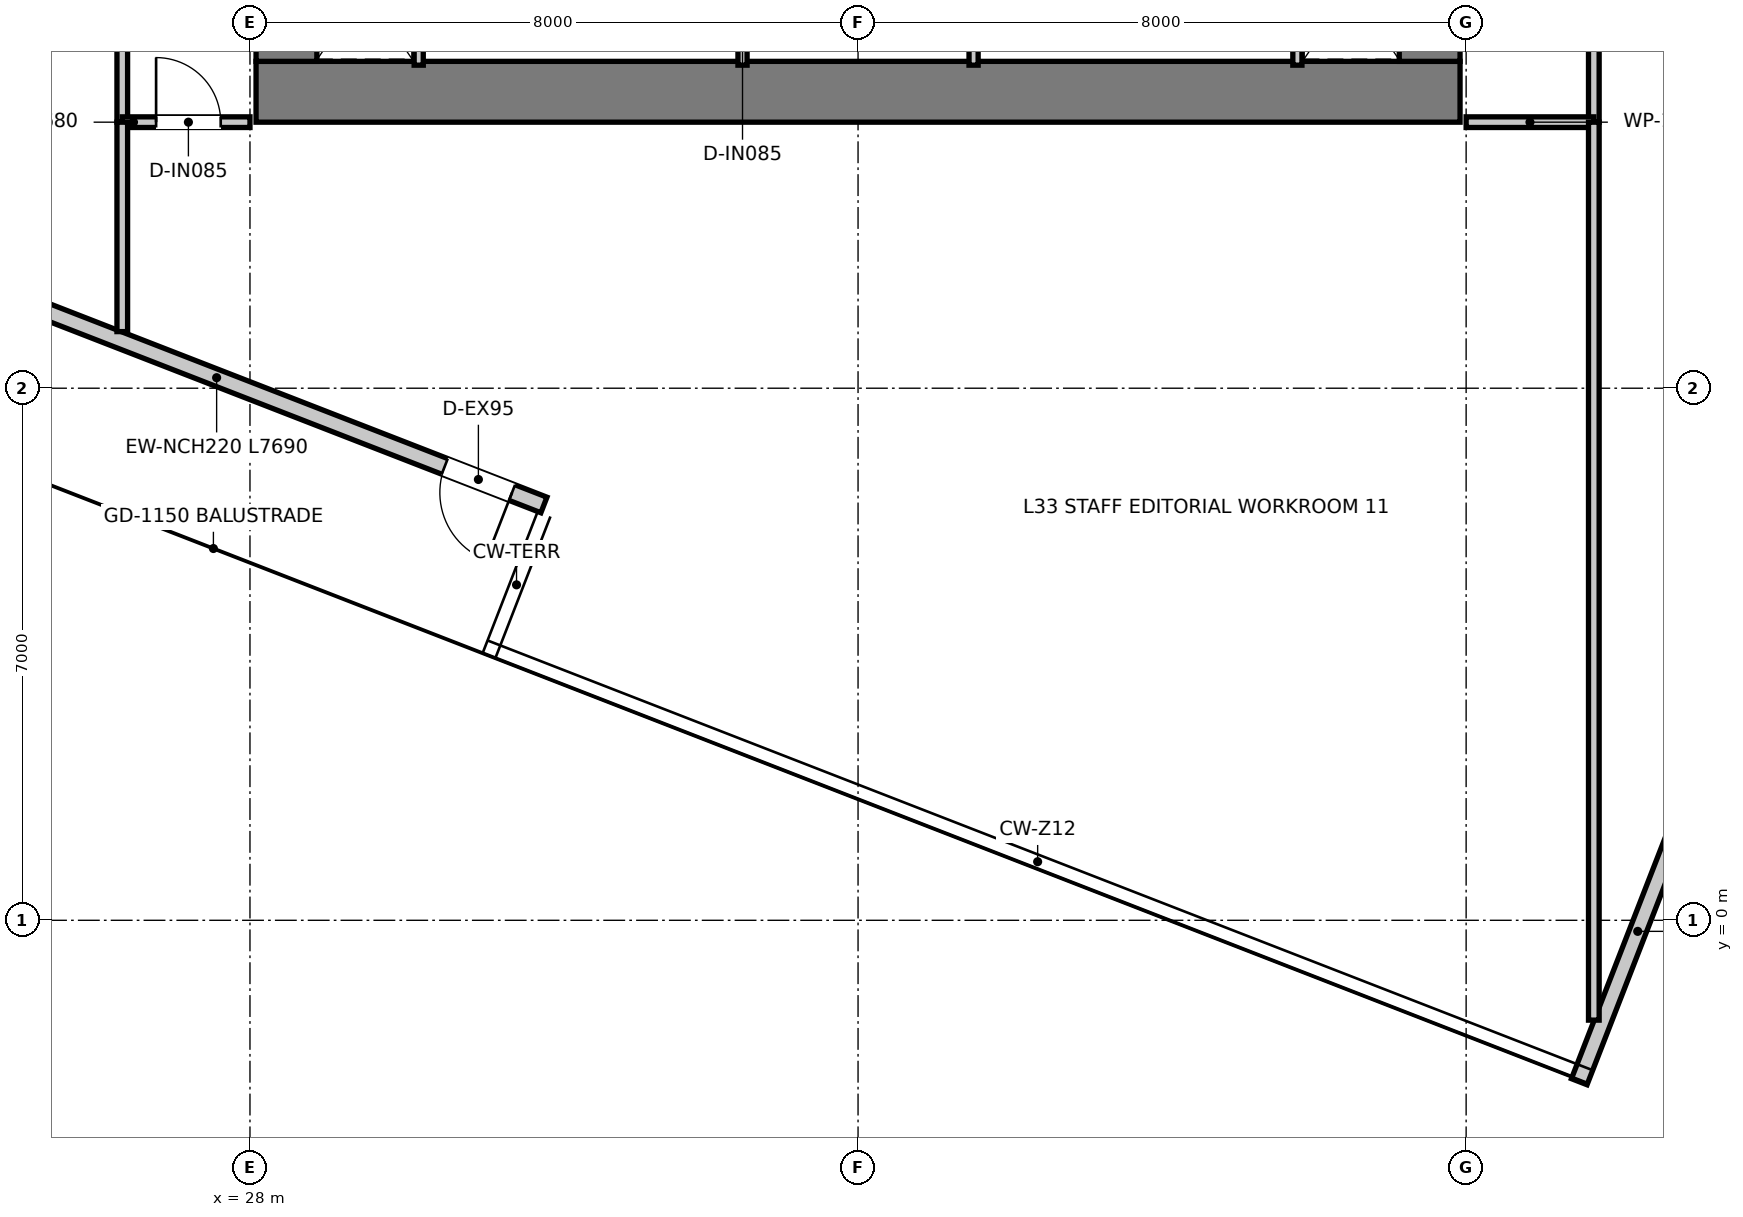
"""IFC4 building model, lengths in metres.
Left out: names, types, materials, properties, quantities, classifications, styles, units other than length and angle.
Written with IfcOpenShell. Run it as: python <this file> out.ifc"""

import sys

from ifc_helpers import new_model, si_unit, direction, frame, frame_2d, origin, place, context, subcontext, project, spatial, rectangle, extrude, element, fill, save


model = new_model("IFC4")
c1 = context("Model", 3, precision=1e-05, world=origin(), true_north=direction((0.0, 1.0)))
c2 = subcontext(c1, "Body", "Model", "MODEL_VIEW")
j1 = project(units=[si_unit("LENGTHUNIT", "METRE"), si_unit("PLANEANGLEUNIT", "RADIAN")], contexts=[c1])
p1 = place(None, origin())
s1 = spatial("IfcSite", under=j1, at=p1, CompositionType="ELEMENT")
p2 = place(p1, origin())
s2 = spatial("IfcBuilding", under=s1, at=p2, CompositionType="ELEMENT")
p3 = place(p2, frame((0.0, 0.0, 137.45)))
s3 = spatial("IfcBuildingStorey", under=s2, at=p3, CompositionType="ELEMENT", Elevation=137.45)
p4 = place(p3, frame((28.08, 10.9, 0.0), z_axis=(0.0, 0.0, 1.0), x_axis=(1.0, 0.0, 0.0)))
e1 = element("IfcWall", 1, at=p4, inside=s3, PredefinedType="SHEAR", context=c2, shape_type="SweptSolid", body=[
    extrude(rectangle(XDim=15.84, YDim=0.8, at=frame_2d((7.92, 0.0))), origin(), (0.0, 0.0, 1.0), 3.95),
])
for number, where, z_axis, x_axis in (
    (2, (28.48, 11.3, 0.0), (0.0, 0.0, 1.0), (0.0, 1.0, 0.0)),
    (3, (43.52, 11.3, 0.0), (0.0, 0.0, 1.0), (0.0, 1.0, 0.0)),
):
    element("IfcWall", number, at=place(p3, frame(where, z_axis=z_axis, x_axis=x_axis)), inside=s3, PredefinedType="SHEAR", context=c2, shape_type="SweptSolid", body=[
        extrude(rectangle(XDim=14.7, YDim=0.8, at=frame_2d((7.35, 0.0))), origin(), (0.0, 0.0, 1.0), 3.95),
    ])
p5 = place(p3, frame((31.867, 5.464, 0.0), z_axis=(0.0, 0.0, 1.0), x_axis=(-0.931996329979, 0.362467710157, 0.0)))
e4 = element("IfcWall", 4, at=p5, inside=s3, PredefinedType="ELEMENTEDWALL", context=c2, shape_type="SweptSolid", body=[
    extrude(rectangle(XDim=7.69, YDim=0.22, at=frame_2d((3.845, 0.0))), origin(), (0.0, 0.0, 1.0), 3.6),
])
p6 = place(p5, frame((0.45, 0.0, 0.0)))
e5 = element("IfcOpeningElement", 5, at=p6, cuts=e4, PredefinedType="OPENING", context=c2, shape_type="SweptSolid", body=[
    extrude(rectangle(XDim=0.95, YDim=2.1, at=frame_2d((0.475, 1.05))), frame((0.0, 0.12, 0.0), z_axis=(0.0, -1.0, 0.0), x_axis=(1.0, 0.0, 0.0)), (0.0, 0.0, 1.0), 0.24),
])
p7 = place(p3, frame((45.488, -2.124, 0.0), z_axis=(0.0, 0.0, 1.0), x_axis=(0.362429609335, 0.932011147078, 0.0)))
e6 = element("IfcWall", 6, at=p7, inside=s3, PredefinedType="ELEMENTEDWALL", context=c2, shape_type="SweptSolid", body=[
    extrude(rectangle(XDim=4.245, YDim=0.22, at=frame_2d((2.123, 0.0))), origin(), (0.0, 0.0, 1.0), 3.6),
])
for number, where, z_axis, x_axis in (
    (7, (30.22, 11.25, 0.0), (0.0, 0.0, 1.0), (0.0, 1.0, 0.0)),
    (8, (41.78, 11.25, 0.0), (0.0, 0.0, 1.0), (0.0, 1.0, 0.0)),
):
    element("IfcWall", number, at=place(p3, frame(where, z_axis=z_axis, x_axis=x_axis)), inside=s3, PredefinedType="PARTITIONING", context=c2, shape_type="SweptSolid", body=[
        extrude(rectangle(XDim=1.97, YDim=0.12, at=frame_2d((0.985, 0.0))), origin(), (0.0, 0.0, 1.0), 3.6),
    ])
p8 = place(p3, frame((34.48, 11.25, 0.0), z_axis=(0.0, 0.0, 1.0), x_axis=(0.0, 1.0, 0.0)))
e9 = element("IfcWall", 9, at=p8, inside=s3, PredefinedType="PARTITIONING", context=c2, shape_type="SweptSolid", body=[
    extrude(rectangle(XDim=1.97, YDim=0.12, at=frame_2d((0.985, 0.0))), origin(), (0.0, 0.0, 1.0), 3.6),
])
p9 = place(p8, frame((0.545, 0.0, 0.0)))
e10 = element("IfcOpeningElement", 10, at=p9, cuts=e9, PredefinedType="OPENING", context=c2, shape_type="SweptSolid", body=[
    extrude(rectangle(XDim=0.85, YDim=2.1, at=frame_2d((0.425, 1.05))), frame((0.0, 0.07, 0.0), z_axis=(0.0, -1.0, 0.0), x_axis=(1.0, 0.0, 0.0)), (0.0, 0.0, 1.0), 0.14),
])
p10 = place(p3, frame((37.52, 11.25, 0.0), z_axis=(0.0, 0.0, 1.0), x_axis=(0.0, 1.0, 0.0)))
e11 = element("IfcWall", 11, at=p10, inside=s3, PredefinedType="PARTITIONING", context=c2, shape_type="SweptSolid", body=[
    extrude(rectangle(XDim=1.97, YDim=0.12, at=frame_2d((0.985, 0.0))), origin(), (0.0, 0.0, 1.0), 3.6),
])
p11 = place(p10, frame((0.545, 0.0, 0.0)))
e12 = element("IfcOpeningElement", 12, at=p11, cuts=e11, PredefinedType="OPENING", context=c2, shape_type="SweptSolid", body=[
    extrude(rectangle(XDim=0.85, YDim=2.1, at=frame_2d((0.425, 1.05))), frame((0.0, 0.07, 0.0), z_axis=(0.0, -1.0, 0.0), x_axis=(1.0, 0.0, 0.0)), (0.0, 0.0, 1.0), 0.14),
])
p12 = place(p3, frame((26.32, 10.5, 0.0), z_axis=(0.0, 0.0, 1.0), x_axis=(0.0, 1.0, 0.0)))
e13 = element("IfcWall", 13, at=p12, inside=s3, PredefinedType="PARTITIONING", context=c2, shape_type="SweptSolid", body=[
    extrude(rectangle(XDim=25.62, YDim=0.14, at=frame_2d((12.81, 0.0))), origin(), (0.0, 0.0, 1.0), 2.9),
])
p13 = place(p12, frame((9.525, 0.0, 0.0)))
e14 = element("IfcOpeningElement", 14, at=p13, cuts=e13, PredefinedType="OPENING", context=c2, shape_type="SweptSolid", body=[
    extrude(rectangle(XDim=0.95, YDim=2.1, at=frame_2d((0.475, 1.05))), frame((0.0, 0.08, 0.0), z_axis=(0.0, -1.0, 0.0), x_axis=(1.0, 0.0, 0.0)), (0.0, 0.0, 1.0), 0.16),
])
p14 = place(p12, frame((16.525, 0.0, 0.0)))
e15 = element("IfcOpeningElement", 15, at=p14, cuts=e13, PredefinedType="OPENING", context=c2, shape_type="SweptSolid", body=[
    extrude(rectangle(XDim=0.95, YDim=2.1, at=frame_2d((0.475, 1.05))), frame((0.0, 0.08, 0.0), z_axis=(0.0, -1.0, 0.0), x_axis=(1.0, 0.0, 0.0)), (0.0, 0.0, 1.0), 0.16),
])
p15 = place(p12, frame((22.125, 0.0, 0.0)))
e16 = element("IfcOpeningElement", 16, at=p15, cuts=e13, PredefinedType="OPENING", context=c2, shape_type="SweptSolid", body=[
    extrude(rectangle(XDim=0.95, YDim=2.1, at=frame_2d((0.475, 1.05))), frame((0.0, 0.08, 0.0), z_axis=(0.0, -1.0, 0.0), x_axis=(1.0, 0.0, 0.0)), (0.0, 0.0, 1.0), 0.16),
])
p16 = place(p3, frame((45.68, 10.5, 0.0), z_axis=(0.0, 0.0, 1.0), x_axis=(0.0, 1.0, 0.0)))
e17 = element("IfcWall", 17, at=p16, inside=s3, PredefinedType="PARTITIONING", context=c2, shape_type="SweptSolid", body=[
    extrude(rectangle(XDim=25.62, YDim=0.14, at=frame_2d((12.81, 0.0))), origin(), (0.0, 0.0, 1.0), 2.9),
])
p17 = place(p16, frame((7.775, 0.0, 0.0)))
e18 = element("IfcOpeningElement", 18, at=p17, cuts=e17, PredefinedType="OPENING", context=c2, shape_type="SweptSolid", body=[
    extrude(rectangle(XDim=0.95, YDim=2.1, at=frame_2d((0.475, 1.05))), frame((0.0, 0.08, 0.0), z_axis=(0.0, -1.0, 0.0), x_axis=(1.0, 0.0, 0.0)), (0.0, 0.0, 1.0), 0.16),
])
p18 = place(p16, frame((11.775, 0.0, 0.0)))
e19 = element("IfcOpeningElement", 19, at=p18, cuts=e17, PredefinedType="OPENING", context=c2, shape_type="SweptSolid", body=[
    extrude(rectangle(XDim=0.95, YDim=2.1, at=frame_2d((0.475, 1.05))), frame((0.0, 0.08, 0.0), z_axis=(0.0, -1.0, 0.0), x_axis=(1.0, 0.0, 0.0)), (0.0, 0.0, 1.0), 0.16),
])
p19 = place(p16, frame((17.275, 0.0, 0.0)))
e20 = element("IfcOpeningElement", 20, at=p19, cuts=e17, PredefinedType="OPENING", context=c2, shape_type="SweptSolid", body=[
    extrude(rectangle(XDim=0.95, YDim=2.1, at=frame_2d((0.475, 1.05))), frame((0.0, 0.08, 0.0), z_axis=(0.0, -1.0, 0.0), x_axis=(1.0, 0.0, 0.0)), (0.0, 0.0, 1.0), 0.16),
])
p20 = place(p16, frame((21.875, 0.0, 0.0)))
e21 = element("IfcOpeningElement", 21, at=p20, cuts=e17, PredefinedType="OPENING", context=c2, shape_type="SweptSolid", body=[
    extrude(rectangle(XDim=0.95, YDim=2.1, at=frame_2d((0.475, 1.05))), frame((0.0, 0.08, 0.0), z_axis=(0.0, -1.0, 0.0), x_axis=(1.0, 0.0, 0.0)), (0.0, 0.0, 1.0), 0.16),
])
p21 = place(p3, frame((26.32, 10.5, 0.0), z_axis=(0.0, 0.0, 1.0), x_axis=(1.0, 0.0, 0.0)))
e22 = element("IfcWall", 22, at=p21, inside=s3, PredefinedType="PARTITIONING", context=c2, shape_type="SweptSolid", body=[
    extrude(rectangle(XDim=1.68, YDim=0.14, at=frame_2d((0.84, 0.0))), origin(), (0.0, 0.0, 1.0), 3.6),
])
p22 = place(p21, frame((0.445, 0.0, 0.0)))
e23 = element("IfcOpeningElement", 23, at=p22, cuts=e22, PredefinedType="OPENING", context=c2, shape_type="SweptSolid", body=[
    extrude(rectangle(XDim=0.85, YDim=2.1, at=frame_2d((0.425, 1.05))), frame((0.0, 0.08, 0.0), z_axis=(0.0, -1.0, 0.0), x_axis=(1.0, 0.0, 0.0)), (0.0, 0.0, 1.0), 0.16),
])
p23 = place(p3, frame((44.0, 10.5, 0.0), z_axis=(0.0, 0.0, 1.0), x_axis=(1.0, 0.0, 0.0)))
e24 = element("IfcWall", 24, at=p23, inside=s3, PredefinedType="PARTITIONING", context=c2, shape_type="SweptSolid", body=[
    extrude(rectangle(XDim=1.68, YDim=0.14, at=frame_2d((0.84, 0.0))), origin(), (0.0, 0.0, 1.0), 3.6),
])
p24 = place(p3, frame((26.32, 7.745, 0.0), z_axis=(0.0, 0.0, 1.0), x_axis=(0.0, 1.0, 0.0)))
e25 = element("IfcWall", 25, at=p24, inside=s3, PredefinedType="PARTITIONING", context=c2, shape_type="SweptSolid", body=[
    extrude(rectangle(XDim=2.755, YDim=0.14, at=frame_2d((1.378, 0.0))), origin(), (0.0, 0.0, 1.0), 3.6),
])
p25 = place(p3, frame((45.68, -1.313, 0.0), z_axis=(0.0, 0.0, 1.0), x_axis=(0.0, 1.0, 0.0)))
e26 = element("IfcWall", 26, at=p25, inside=s3, PredefinedType="PARTITIONING", context=c2, shape_type="SweptSolid", body=[
    extrude(rectangle(XDim=11.813, YDim=0.14, at=frame_2d((5.907, 0.0))), origin(), (0.0, 0.0, 1.0), 3.6),
])
p26 = place(p22, origin())
e27 = element("IfcDoor", 27, at=p26, inside=s3, OperationType="SINGLE_SWING_LEFT", PredefinedType="DOOR", context=c2, shape_type="SweptSolid", body=[
    extrude(rectangle(XDim=0.85, YDim=2.1, at=frame_2d((0.425, 1.05))), frame((0.0, 0.025, 0.0), z_axis=(0.0, -1.0, 0.0), x_axis=(1.0, 0.0, 0.0)), (0.0, 0.0, 1.0), 0.05),
])
fill(e23, e27)
p27 = place(p6, origin())
e28 = element("IfcDoor", 28, at=p27, inside=s3, OperationType="SINGLE_SWING_LEFT", PredefinedType="DOOR", context=c2, shape_type="SweptSolid", body=[
    extrude(rectangle(XDim=0.95, YDim=2.1, at=frame_2d((0.475, 1.05))), frame((0.0, 0.025, 0.0), z_axis=(0.0, -1.0, 0.0), x_axis=(1.0, 0.0, 0.0)), (0.0, 0.0, 1.0), 0.05),
])
fill(e5, e28)
save(model, sys.argv[1])
